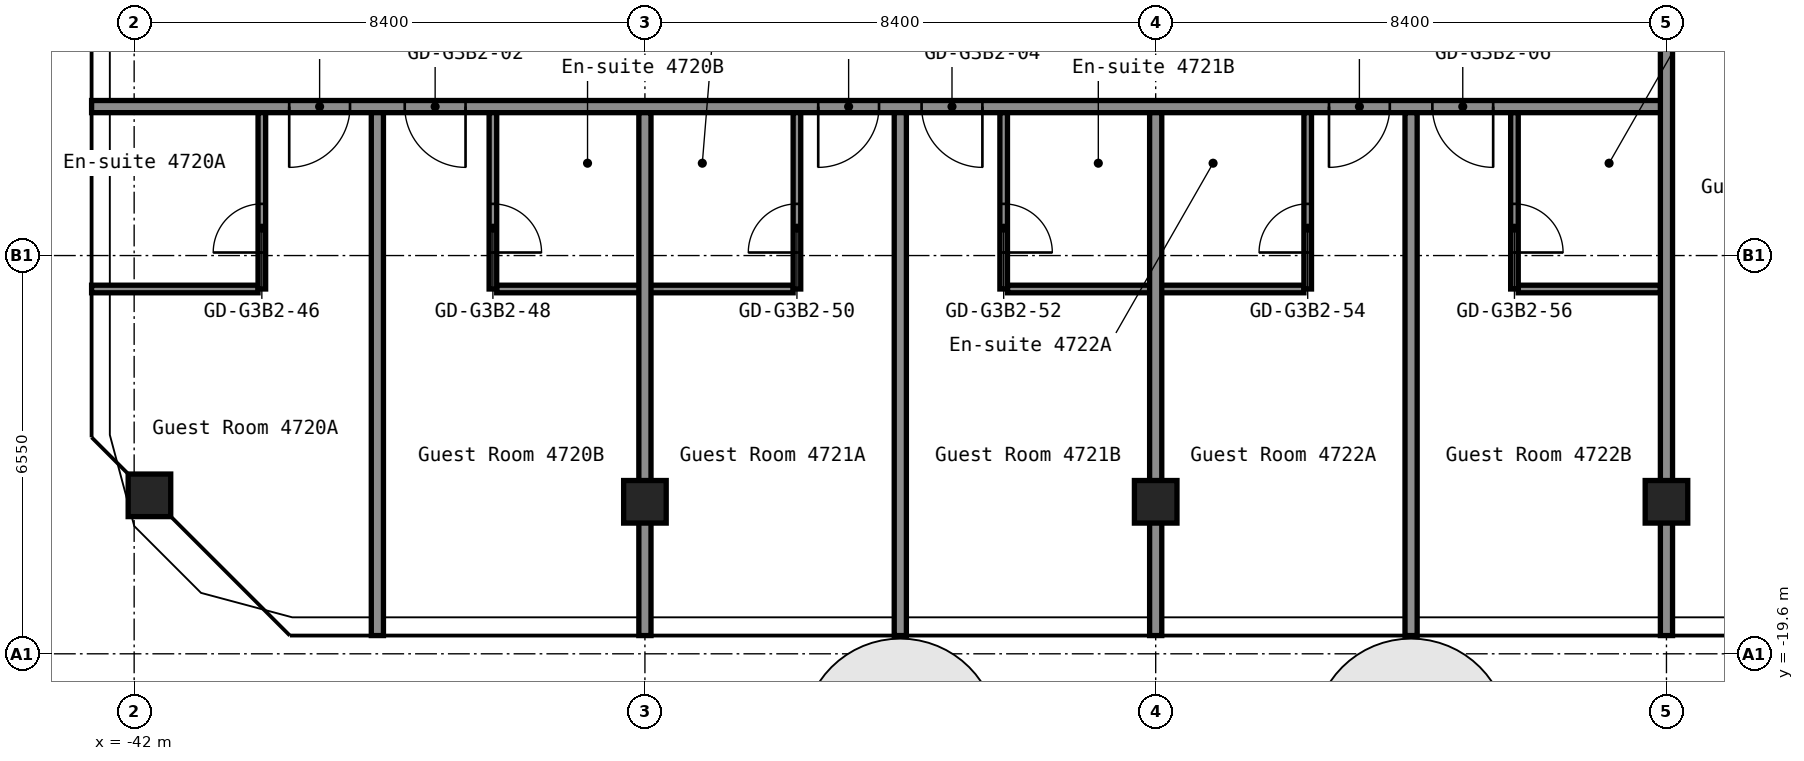
"""IFC4 building model, lengths in metres.
Left out: names, types, materials, properties, quantities, classifications, styles, units other than length and angle.
Written with IfcOpenShell. Run it as: python <this file> out.ifc"""

import sys

from ifc_helpers import new_model, si_unit, direction, frame, frame_2d, origin, origin_2d, place, context, subcontext, project, spatial, rectangle, hollow_rectangle, extrude, element, fill, save


model = new_model("IFC4")
c1 = context("Model", 3, precision=1e-05, world=origin(), true_north=direction((0.0, 1.0)))
c2 = subcontext(c1, "Body", "Model", "MODEL_VIEW")
j1 = project(units=[si_unit("LENGTHUNIT", "METRE"), si_unit("PLANEANGLEUNIT", "RADIAN")], contexts=[c1])
p1 = place(None, origin())
s1 = spatial("IfcSite", under=j1, at=p1, CompositionType="ELEMENT")
p2 = place(p1, origin())
s2 = spatial("IfcBuilding", under=s1, at=p2, CompositionType="ELEMENT")
p3 = place(p2, frame((0.0, 0.0, 166.2)))
s3 = spatial("IfcBuildingStorey", under=s2, at=p3, CompositionType="ELEMENT", Elevation=166.2)
for number, where, z_axis, x_axis in (
    (1, (-41.749, -16.994, 0.0), (0.0, 0.0, 1.0), (1.0, 0.0, 0.0)),
    (2, (-33.6, -17.1, 0.0), (0.0, 0.0, 1.0), (1.0, 0.0, 0.0)),
    (3, (-25.2, -17.1, 0.0), (0.0, 0.0, 1.0), (1.0, 0.0, 0.0)),
    (4, (-16.8, -17.1, 0.0), (0.0, 0.0, 1.0), (1.0, 0.0, 0.0)),
):
    element("IfcColumn", number, at=place(p3, frame(where, z_axis=z_axis, x_axis=x_axis)), inside=s3, PredefinedType="COLUMN", context=c2, shape_type="SweptSolid", body=[
        extrude(hollow_rectangle(XDim=0.7, YDim=0.7, WallThickness=0.028, at=origin_2d()), origin(), (0.0, 0.0, 1.0), 2.75),
    ])
p4 = place(p3, frame((-42.7, -13.6, 0.0), z_axis=(0.0, 0.0, 1.0), x_axis=(1.0, 0.0, 0.0)))
e5 = element("IfcWall", 5, at=p4, inside=s3, PredefinedType="PARTITIONING", context=c2, shape_type="SweptSolid", body=[
    extrude(rectangle(XDim=2.738, YDim=0.125, at=frame_2d((1.369, 0.0))), origin(), (0.0, 0.0, 1.0), 2.75),
])
for number, where, z_axis, x_axis in (
    (6, (-36.038, -13.6, 0.0), (0.0, 0.0, 1.0), (1.0, 0.0, 0.0)),
    (7, (-27.637, -13.6, 0.0), (0.0, 0.0, 1.0), (1.0, 0.0, 0.0)),
):
    element("IfcWall", number, at=place(p3, frame(where, z_axis=z_axis, x_axis=x_axis)), inside=s3, PredefinedType="PARTITIONING", context=c2, shape_type="SweptSolid", body=[
        extrude(rectangle(XDim=4.875, YDim=0.125, at=frame_2d((2.438, 0.0))), origin(), (0.0, 0.0, 1.0), 2.75),
    ])
p5 = place(p3, frame((-19.238, -13.6, 0.0), z_axis=(0.0, 0.0, 1.0), x_axis=(1.0, 0.0, 0.0)))
e8 = element("IfcWall", 8, at=p5, inside=s3, PredefinedType="PARTITIONING", context=c2, shape_type="SweptSolid", body=[
    extrude(rectangle(XDim=2.338, YDim=0.125, at=frame_2d((1.169, 0.0))), origin(), (0.0, 0.0, 1.0), 2.75),
])
p6 = place(p3, frame((-42.7, -10.6, 0.0), z_axis=(0.0, 0.0, 1.0), x_axis=(1.0, 0.0, 0.0)))
e9 = element("IfcWall", 9, at=p6, inside=s3, PredefinedType="PARTITIONING", context=c2, shape_type="SweptSolid", body=[
    extrude(rectangle(XDim=25.9, YDim=0.2, at=frame_2d((12.95, 0.0))), origin(), (0.0, 0.0, 1.0), 2.75),
])
p7 = place(p6, frame((3.25, 0.0, 0.0)))
e10 = element("IfcOpeningElement", 10, at=p7, cuts=e9, PredefinedType="OPENING", context=c2, shape_type="SweptSolid", body=[
    extrude(rectangle(XDim=1.0, YDim=2.1, at=frame_2d((0.5, 1.05))), frame((0.0, 0.11, 0.0), z_axis=(0.0, -1.0, 0.0), x_axis=(1.0, 0.0, 0.0)), (0.0, 0.0, 1.0), 0.22),
])
p8 = place(p6, frame((5.15, 0.0, 0.0)))
e11 = element("IfcOpeningElement", 11, at=p8, cuts=e9, PredefinedType="OPENING", context=c2, shape_type="SweptSolid", body=[
    extrude(rectangle(XDim=1.0, YDim=2.1, at=frame_2d((0.5, 1.05))), frame((0.0, 0.11, 0.0), z_axis=(0.0, -1.0, 0.0), x_axis=(1.0, 0.0, 0.0)), (0.0, 0.0, 1.0), 0.22),
])
p9 = place(p6, frame((11.95, 0.0, 0.0)))
e12 = element("IfcOpeningElement", 12, at=p9, cuts=e9, PredefinedType="OPENING", context=c2, shape_type="SweptSolid", body=[
    extrude(rectangle(XDim=1.0, YDim=2.1, at=frame_2d((0.5, 1.05))), frame((0.0, 0.11, 0.0), z_axis=(0.0, -1.0, 0.0), x_axis=(1.0, 0.0, 0.0)), (0.0, 0.0, 1.0), 0.22),
])
p10 = place(p6, frame((13.65, 0.0, 0.0)))
e13 = element("IfcOpeningElement", 13, at=p10, cuts=e9, PredefinedType="OPENING", context=c2, shape_type="SweptSolid", body=[
    extrude(rectangle(XDim=1.0, YDim=2.1, at=frame_2d((0.5, 1.05))), frame((0.0, 0.11, 0.0), z_axis=(0.0, -1.0, 0.0), x_axis=(1.0, 0.0, 0.0)), (0.0, 0.0, 1.0), 0.22),
])
p11 = place(p6, frame((20.35, 0.0, 0.0)))
e14 = element("IfcOpeningElement", 14, at=p11, cuts=e9, PredefinedType="OPENING", context=c2, shape_type="SweptSolid", body=[
    extrude(rectangle(XDim=1.0, YDim=2.1, at=frame_2d((0.5, 1.05))), frame((0.0, 0.11, 0.0), z_axis=(0.0, -1.0, 0.0), x_axis=(1.0, 0.0, 0.0)), (0.0, 0.0, 1.0), 0.22),
])
p12 = place(p6, frame((22.05, 0.0, 0.0)))
e15 = element("IfcOpeningElement", 15, at=p12, cuts=e9, PredefinedType="OPENING", context=c2, shape_type="SweptSolid", body=[
    extrude(rectangle(XDim=1.0, YDim=2.1, at=frame_2d((0.5, 1.05))), frame((0.0, 0.11, 0.0), z_axis=(0.0, -1.0, 0.0), x_axis=(1.0, 0.0, 0.0)), (0.0, 0.0, 1.0), 0.22),
])
p13 = place(p3, frame((-39.9, -13.6, 0.0), z_axis=(0.0, 0.0, 1.0), x_axis=(0.0, 1.0, 0.0)))
e16 = element("IfcWall", 16, at=p13, inside=s3, PredefinedType="PARTITIONING", context=c2, shape_type="SweptSolid", body=[
    extrude(rectangle(XDim=2.9, YDim=0.125, at=frame_2d((1.45, 0.0))), origin(), (0.0, 0.0, 1.0), 2.75),
])
p14 = place(p13, frame((0.6, 0.0, 0.0)))
e17 = element("IfcOpeningElement", 17, at=p14, cuts=e16, PredefinedType="OPENING", context=c2, shape_type="SweptSolid", body=[
    extrude(rectangle(XDim=0.8, YDim=2.1, at=frame_2d((0.4, 1.05))), frame((0.0, 0.073, 0.0), z_axis=(0.0, -1.0, 0.0), x_axis=(1.0, 0.0, 0.0)), (0.0, 0.0, 1.0), 0.145),
])
p15 = place(p3, frame((-38.0, -19.3, 0.0), z_axis=(0.0, 0.0, 1.0), x_axis=(0.0, 1.0, 0.0)))
e18 = element("IfcWall", 18, at=p15, inside=s3, PredefinedType="PARTITIONING", context=c2, shape_type="SweptSolid", body=[
    extrude(rectangle(XDim=8.6, YDim=0.2, at=frame_2d((4.3, 0.0))), origin(), (0.0, 0.0, 1.0), 2.75),
])
p16 = place(p3, frame((-36.1, -13.6, 0.0), z_axis=(0.0, 0.0, 1.0), x_axis=(0.0, 1.0, 0.0)))
e19 = element("IfcWall", 19, at=p16, inside=s3, PredefinedType="PARTITIONING", context=c2, shape_type="SweptSolid", body=[
    extrude(rectangle(XDim=2.9, YDim=0.125, at=frame_2d((1.45, 0.0))), origin(), (0.0, 0.0, 1.0), 2.75),
])
p17 = place(p16, frame((0.6, 0.0, 0.0)))
e20 = element("IfcOpeningElement", 20, at=p17, cuts=e19, PredefinedType="OPENING", context=c2, shape_type="SweptSolid", body=[
    extrude(rectangle(XDim=0.8, YDim=2.1, at=frame_2d((0.4, 1.05))), frame((0.0, 0.073, 0.0), z_axis=(0.0, -1.0, 0.0), x_axis=(1.0, 0.0, 0.0)), (0.0, 0.0, 1.0), 0.145),
])
p18 = place(p3, frame((-33.6, -19.3, 0.0), z_axis=(0.0, 0.0, 1.0), x_axis=(0.0, 1.0, 0.0)))
e21 = element("IfcWall", 21, at=p18, inside=s3, PredefinedType="PARTITIONING", context=c2, shape_type="SweptSolid", body=[
    extrude(rectangle(XDim=8.6, YDim=0.2, at=frame_2d((4.3, 0.0))), origin(), (0.0, 0.0, 1.0), 2.75),
])
p19 = place(p3, frame((-31.1, -13.6, 0.0), z_axis=(0.0, 0.0, 1.0), x_axis=(0.0, 1.0, 0.0)))
e22 = element("IfcWall", 22, at=p19, inside=s3, PredefinedType="PARTITIONING", context=c2, shape_type="SweptSolid", body=[
    extrude(rectangle(XDim=2.9, YDim=0.125, at=frame_2d((1.45, 0.0))), origin(), (0.0, 0.0, 1.0), 2.75),
])
p20 = place(p19, frame((0.6, 0.0, 0.0)))
e23 = element("IfcOpeningElement", 23, at=p20, cuts=e22, PredefinedType="OPENING", context=c2, shape_type="SweptSolid", body=[
    extrude(rectangle(XDim=0.8, YDim=2.1, at=frame_2d((0.4, 1.05))), frame((0.0, 0.073, 0.0), z_axis=(0.0, -1.0, 0.0), x_axis=(1.0, 0.0, 0.0)), (0.0, 0.0, 1.0), 0.145),
])
p21 = place(p3, frame((-29.4, -19.3, 0.0), z_axis=(0.0, 0.0, 1.0), x_axis=(0.0, 1.0, 0.0)))
e24 = element("IfcWall", 24, at=p21, inside=s3, PredefinedType="PARTITIONING", context=c2, shape_type="SweptSolid", body=[
    extrude(rectangle(XDim=8.6, YDim=0.2, at=frame_2d((4.3, 0.0))), origin(), (0.0, 0.0, 1.0), 2.75),
])
p22 = place(p3, frame((-27.7, -13.6, 0.0), z_axis=(0.0, 0.0, 1.0), x_axis=(0.0, 1.0, 0.0)))
e25 = element("IfcWall", 25, at=p22, inside=s3, PredefinedType="PARTITIONING", context=c2, shape_type="SweptSolid", body=[
    extrude(rectangle(XDim=2.9, YDim=0.125, at=frame_2d((1.45, 0.0))), origin(), (0.0, 0.0, 1.0), 2.75),
])
p23 = place(p22, frame((0.6, 0.0, 0.0)))
e26 = element("IfcOpeningElement", 26, at=p23, cuts=e25, PredefinedType="OPENING", context=c2, shape_type="SweptSolid", body=[
    extrude(rectangle(XDim=0.8, YDim=2.1, at=frame_2d((0.4, 1.05))), frame((0.0, 0.073, 0.0), z_axis=(0.0, -1.0, 0.0), x_axis=(1.0, 0.0, 0.0)), (0.0, 0.0, 1.0), 0.145),
])
p24 = place(p3, frame((-25.2, -19.3, 0.0), z_axis=(0.0, 0.0, 1.0), x_axis=(0.0, 1.0, 0.0)))
e27 = element("IfcWall", 27, at=p24, inside=s3, PredefinedType="PARTITIONING", context=c2, shape_type="SweptSolid", body=[
    extrude(rectangle(XDim=8.6, YDim=0.2, at=frame_2d((4.3, 0.0))), origin(), (0.0, 0.0, 1.0), 2.75),
])
p25 = place(p3, frame((-22.7, -13.6, 0.0), z_axis=(0.0, 0.0, 1.0), x_axis=(0.0, 1.0, 0.0)))
e28 = element("IfcWall", 28, at=p25, inside=s3, PredefinedType="PARTITIONING", context=c2, shape_type="SweptSolid", body=[
    extrude(rectangle(XDim=2.9, YDim=0.125, at=frame_2d((1.45, 0.0))), origin(), (0.0, 0.0, 1.0), 2.75),
])
p26 = place(p25, frame((0.6, 0.0, 0.0)))
e29 = element("IfcOpeningElement", 29, at=p26, cuts=e28, PredefinedType="OPENING", context=c2, shape_type="SweptSolid", body=[
    extrude(rectangle(XDim=0.8, YDim=2.1, at=frame_2d((0.4, 1.05))), frame((0.0, 0.073, 0.0), z_axis=(0.0, -1.0, 0.0), x_axis=(1.0, 0.0, 0.0)), (0.0, 0.0, 1.0), 0.145),
])
p27 = place(p3, frame((-21.0, -19.3, 0.0), z_axis=(0.0, 0.0, 1.0), x_axis=(0.0, 1.0, 0.0)))
e30 = element("IfcWall", 30, at=p27, inside=s3, PredefinedType="PARTITIONING", context=c2, shape_type="SweptSolid", body=[
    extrude(rectangle(XDim=8.6, YDim=0.2, at=frame_2d((4.3, 0.0))), origin(), (0.0, 0.0, 1.0), 2.75),
])
p28 = place(p3, frame((-19.3, -13.6, 0.0), z_axis=(0.0, 0.0, 1.0), x_axis=(0.0, 1.0, 0.0)))
e31 = element("IfcWall", 31, at=p28, inside=s3, PredefinedType="PARTITIONING", context=c2, shape_type="SweptSolid", body=[
    extrude(rectangle(XDim=2.9, YDim=0.125, at=frame_2d((1.45, 0.0))), origin(), (0.0, 0.0, 1.0), 2.75),
])
p29 = place(p28, frame((0.6, 0.0, 0.0)))
e32 = element("IfcOpeningElement", 32, at=p29, cuts=e31, PredefinedType="OPENING", context=c2, shape_type="SweptSolid", body=[
    extrude(rectangle(XDim=0.8, YDim=2.1, at=frame_2d((0.4, 1.05))), frame((0.0, 0.073, 0.0), z_axis=(0.0, -1.0, 0.0), x_axis=(1.0, 0.0, 0.0)), (0.0, 0.0, 1.0), 0.145),
])
p30 = place(p3, frame((-16.8, -19.3, 0.0), z_axis=(0.0, 0.0, 1.0), x_axis=(0.0, 1.0, 0.0)))
e33 = element("IfcWall", 33, at=p30, inside=s3, PredefinedType="PARTITIONING", context=c2, shape_type="SweptSolid", body=[
    extrude(rectangle(XDim=10.91, YDim=0.2, at=frame_2d((5.455, 0.0))), origin(), (0.0, 0.0, 1.0), 2.75),
])
p31 = place(p7, origin())
e34 = element("IfcDoor", 34, at=p31, inside=s3, OperationType="SINGLE_SWING_LEFT", PredefinedType="DOOR", context=c2, shape_type="SweptSolid", body=[
    extrude(rectangle(XDim=1.0, YDim=2.1, at=frame_2d((0.5, 1.05))), frame((0.0, 0.025, 0.0), z_axis=(0.0, -1.0, 0.0), x_axis=(1.0, 0.0, 0.0)), (0.0, 0.0, 1.0), 0.05),
])
fill(e10, e34)
p32 = place(p8, origin())
e35 = element("IfcDoor", 35, at=p32, inside=s3, OperationType="SINGLE_SWING_RIGHT", PredefinedType="DOOR", context=c2, shape_type="SweptSolid", body=[
    extrude(rectangle(XDim=1.0, YDim=2.1, at=frame_2d((0.5, 1.05))), frame((0.0, 0.025, 0.0), z_axis=(0.0, -1.0, 0.0), x_axis=(1.0, 0.0, 0.0)), (0.0, 0.0, 1.0), 0.05),
])
fill(e11, e35)
p33 = place(p9, origin())
e36 = element("IfcDoor", 36, at=p33, inside=s3, OperationType="SINGLE_SWING_LEFT", PredefinedType="DOOR", context=c2, shape_type="SweptSolid", body=[
    extrude(rectangle(XDim=1.0, YDim=2.1, at=frame_2d((0.5, 1.05))), frame((0.0, 0.025, 0.0), z_axis=(0.0, -1.0, 0.0), x_axis=(1.0, 0.0, 0.0)), (0.0, 0.0, 1.0), 0.05),
])
fill(e12, e36)
p34 = place(p10, origin())
e37 = element("IfcDoor", 37, at=p34, inside=s3, OperationType="SINGLE_SWING_RIGHT", PredefinedType="DOOR", context=c2, shape_type="SweptSolid", body=[
    extrude(rectangle(XDim=1.0, YDim=2.1, at=frame_2d((0.5, 1.05))), frame((0.0, 0.025, 0.0), z_axis=(0.0, -1.0, 0.0), x_axis=(1.0, 0.0, 0.0)), (0.0, 0.0, 1.0), 0.05),
])
fill(e13, e37)
p35 = place(p11, origin())
e38 = element("IfcDoor", 38, at=p35, inside=s3, OperationType="SINGLE_SWING_LEFT", PredefinedType="DOOR", context=c2, shape_type="SweptSolid", body=[
    extrude(rectangle(XDim=1.0, YDim=2.1, at=frame_2d((0.5, 1.05))), frame((0.0, 0.025, 0.0), z_axis=(0.0, -1.0, 0.0), x_axis=(1.0, 0.0, 0.0)), (0.0, 0.0, 1.0), 0.05),
])
fill(e14, e38)
p36 = place(p12, origin())
e39 = element("IfcDoor", 39, at=p36, inside=s3, OperationType="SINGLE_SWING_RIGHT", PredefinedType="DOOR", context=c2, shape_type="SweptSolid", body=[
    extrude(rectangle(XDim=1.0, YDim=2.1, at=frame_2d((0.5, 1.05))), frame((0.0, 0.025, 0.0), z_axis=(0.0, -1.0, 0.0), x_axis=(1.0, 0.0, 0.0)), (0.0, 0.0, 1.0), 0.05),
])
fill(e15, e39)
p37 = place(p14, origin())
e40 = element("IfcDoor", 40, at=p37, inside=s3, OperationType="SINGLE_SWING_RIGHT", PredefinedType="DOOR", context=c2, shape_type="SweptSolid", body=[
    extrude(rectangle(XDim=0.8, YDim=2.1, at=frame_2d((0.4, 1.05))), frame((0.0, 0.025, 0.0), z_axis=(0.0, -1.0, 0.0), x_axis=(1.0, 0.0, 0.0)), (0.0, 0.0, 1.0), 0.05),
])
fill(e17, e40)
p38 = place(p17, origin())
e41 = element("IfcDoor", 41, at=p38, inside=s3, OperationType="SINGLE_SWING_LEFT", PredefinedType="DOOR", context=c2, shape_type="SweptSolid", body=[
    extrude(rectangle(XDim=0.8, YDim=2.1, at=frame_2d((0.4, 1.05))), frame((0.0, 0.025, 0.0), z_axis=(0.0, -1.0, 0.0), x_axis=(1.0, 0.0, 0.0)), (0.0, 0.0, 1.0), 0.05),
])
fill(e20, e41)
p39 = place(p20, origin())
e42 = element("IfcDoor", 42, at=p39, inside=s3, OperationType="SINGLE_SWING_RIGHT", PredefinedType="DOOR", context=c2, shape_type="SweptSolid", body=[
    extrude(rectangle(XDim=0.8, YDim=2.1, at=frame_2d((0.4, 1.05))), frame((0.0, 0.025, 0.0), z_axis=(0.0, -1.0, 0.0), x_axis=(1.0, 0.0, 0.0)), (0.0, 0.0, 1.0), 0.05),
])
fill(e23, e42)
p40 = place(p23, origin())
e43 = element("IfcDoor", 43, at=p40, inside=s3, OperationType="SINGLE_SWING_LEFT", PredefinedType="DOOR", context=c2, shape_type="SweptSolid", body=[
    extrude(rectangle(XDim=0.8, YDim=2.1, at=frame_2d((0.4, 1.05))), frame((0.0, 0.025, 0.0), z_axis=(0.0, -1.0, 0.0), x_axis=(1.0, 0.0, 0.0)), (0.0, 0.0, 1.0), 0.05),
])
fill(e26, e43)
p41 = place(p26, origin())
e44 = element("IfcDoor", 44, at=p41, inside=s3, OperationType="SINGLE_SWING_RIGHT", PredefinedType="DOOR", context=c2, shape_type="SweptSolid", body=[
    extrude(rectangle(XDim=0.8, YDim=2.1, at=frame_2d((0.4, 1.05))), frame((0.0, 0.025, 0.0), z_axis=(0.0, -1.0, 0.0), x_axis=(1.0, 0.0, 0.0)), (0.0, 0.0, 1.0), 0.05),
])
fill(e29, e44)
p42 = place(p29, origin())
e45 = element("IfcDoor", 45, at=p42, inside=s3, OperationType="SINGLE_SWING_LEFT", PredefinedType="DOOR", context=c2, shape_type="SweptSolid", body=[
    extrude(rectangle(XDim=0.8, YDim=2.1, at=frame_2d((0.4, 1.05))), frame((0.0, 0.025, 0.0), z_axis=(0.0, -1.0, 0.0), x_axis=(1.0, 0.0, 0.0)), (0.0, 0.0, 1.0), 0.05),
])
fill(e32, e45)
save(model, sys.argv[1])
